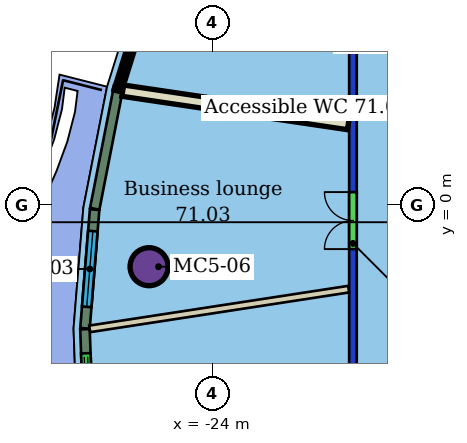
"""IFC4 building model, lengths in metres.
Left out: names, types, materials, properties, quantities, classifications, styles, units other than length and angle.
Written with IfcOpenShell. Run it as: python <this file> out.ifc"""

import sys

from ifc_helpers import new_model, si_unit, direction, frame, frame_2d, origin, origin_2d, place, context, subcontext, project, spatial, rectangle, hollow_circle, extrude, element, fill, save


model = new_model("IFC4")
c1 = context("Model", 3, precision=1e-05, world=origin(), true_north=direction((0.0, 1.0)))
c2 = subcontext(c1, "Body", "Model", "MODEL_VIEW")
j1 = project(units=[si_unit("LENGTHUNIT", "METRE"), si_unit("PLANEANGLEUNIT", "RADIAN")], contexts=[c1])
p1 = place(None, origin())
s1 = spatial("IfcSite", under=j1, at=p1, CompositionType="ELEMENT")
p2 = place(p1, origin())
s2 = spatial("IfcBuilding", under=s1, at=p2, CompositionType="ELEMENT")
p3 = place(p2, frame((0.0, 0.0, 286.5)))
s3 = spatial("IfcBuildingStorey", under=s2, at=p3, CompositionType="ELEMENT", Elevation=286.5)
p4 = place(p3, frame((-25.666, -1.62, 0.0), z_axis=(0.0, 0.0, 1.0), x_axis=(1.0, 0.0, 0.0)))
e1 = element("IfcColumn", 1, at=p4, inside=s3, PredefinedType="COLUMN", context=c2, shape_type="SweptSolid", body=[
    extrude(hollow_circle(Radius=0.5, WallThickness=0.04, at=origin_2d()), origin(), (0.0, 0.0, 1.0), 3.45),
])
p5 = place(p3, frame((-20.3, -9.8, 0.0), z_axis=(0.0, 0.0, 1.0), x_axis=(0.0, 1.0, 0.0)))
e2 = element("IfcWall", 2, at=p5, inside=s3, PredefinedType="PARTITIONING", context=c2, shape_type="SweptSolid", body=[
    extrude(rectangle(XDim=19.6, YDim=0.2, at=frame_2d((9.8, 0.0))), origin(), (0.0, 0.0, 1.0), 3.1),
])
p6 = place(p5, frame((8.643, 0.0, 0.0)))
e3 = element("IfcOpeningElement", 3, at=p6, cuts=e2, PredefinedType="OPENING", context=c2, shape_type="SweptSolid", body=[
    extrude(rectangle(XDim=1.5, YDim=2.1, at=frame_2d((0.75, 1.05))), frame((0.0, 0.11, 0.0), z_axis=(0.0, -1.0, 0.0), x_axis=(1.0, 0.0, 0.0)), (0.0, 0.0, 1.0), 0.22),
])
p7 = place(p5, frame((4.379, 0.0, 0.0)))
e4 = element("IfcOpeningElement", 4, at=p7, cuts=e2, PredefinedType="OPENING", context=c2, shape_type="SweptSolid", body=[
    extrude(rectangle(XDim=1.0, YDim=2.1, at=frame_2d((0.5, 1.05))), frame((0.0, 0.11, 0.0), z_axis=(0.0, -1.0, 0.0), x_axis=(1.0, 0.0, 0.0)), (0.0, 0.0, 1.0), 0.22),
])
p8 = place(p3, frame((-26.358, 3.012, 0.0), z_axis=(0.0, 0.0, 1.0), x_axis=(0.989235111516, -0.146334869885, 0.0)))
e5 = element("IfcWall", 5, at=p8, inside=s3, PredefinedType="PARTITIONING", context=c2, shape_type="SweptSolid", body=[
    extrude(rectangle(XDim=6.001, YDim=0.3, at=frame_2d((3.0, 0.0))), origin(), (0.0, 0.0, 1.0), 3.45),
])
p9 = place(p3, frame((-27.228, -3.256, 0.0), z_axis=(0.0, 0.0, 1.0), x_axis=(0.988435478187, 0.151642030654, 0.0)))
e6 = element("IfcWall", 6, at=p9, inside=s3, PredefinedType="PARTITIONING", context=c2, shape_type="SweptSolid", body=[
    extrude(rectangle(XDim=6.894, YDim=0.175, at=frame_2d((3.447, 0.0))), origin(), (0.0, 0.0, 1.0), 3.45),
])
p10 = place(p3, frame((-26.49, 2.989, 0.0), z_axis=(0.0, 0.0, 1.0), x_axis=(-0.192470190708, -0.981302820585, 0.0)))
e7 = element("IfcWall", 7, at=p10, inside=s3, PredefinedType="SOLIDWALL", context=c2, shape_type="SweptSolid", body=[
    extrude(rectangle(XDim=3.143, YDim=0.25, at=frame_2d((1.572, 0.0))), origin(), (0.0, 0.0, 1.0), 3.15),
])
p11 = place(p3, frame((-27.098, -0.118, 0.0), z_axis=(0.0, 0.0, 1.0), x_axis=(-0.080847238515, -0.996726504125, 0.0)))
e8 = element("IfcWall", 8, at=p11, inside=s3, PredefinedType="SOLIDWALL", context=c2, shape_type="SweptSolid", body=[
    extrude(rectangle(XDim=3.135, YDim=0.25, at=frame_2d((1.567, 0.0))), origin(), (0.0, 0.0, 1.0), 3.15),
])
p12 = place(p11, frame((0.567, 0.0, 0.9)))
e9 = element("IfcOpeningElement", 9, at=p12, cuts=e8, PredefinedType="OPENING", context=c2, shape_type="SweptSolid", body=[
    extrude(rectangle(XDim=2.0, YDim=2.1, at=frame_2d((1.0, 1.05))), frame((0.0, 0.135, 0.0), z_axis=(0.0, -1.0, 0.0), x_axis=(1.0, 0.0, 0.0)), (0.0, 0.0, 1.0), 0.27),
])
p13 = place(p3, frame((-27.352, -3.265, 0.0), z_axis=(0.0, 0.0, 1.0), x_axis=(0.035961121069, -0.999353189704, 0.0)))
e10 = element("IfcWall", 10, at=p13, inside=s3, PredefinedType="SOLIDWALL", context=c2, shape_type="SweptSolid", body=[
    extrude(rectangle(XDim=3.069, YDim=0.25, at=frame_2d((1.534, 0.0))), origin(), (0.0, 0.0, 1.0), 3.15),
])
p14 = place(p13, frame((0.634, 0.0, 0.0)))
e11 = element("IfcOpeningElement", 11, at=p14, cuts=e10, PredefinedType="OPENING", context=c2, shape_type="SweptSolid", body=[
    extrude(rectangle(XDim=1.8, YDim=2.4, at=frame_2d((0.9, 1.2))), frame((0.0, 0.135, 0.0), z_axis=(0.0, -1.0, 0.0), x_axis=(1.0, 0.0, 0.0)), (0.0, 0.0, 1.0), 0.27),
])
p15 = place(p6, origin())
e12 = element("IfcDoor", 12, at=p15, inside=s3, OperationType="DOUBLE_DOOR_SINGLE_SWING", PredefinedType="DOOR", context=c2, shape_type="SweptSolid", body=[
    extrude(rectangle(XDim=1.5, YDim=2.1, at=frame_2d((0.75, 1.05))), frame((0.0, 0.025, 0.0), z_axis=(0.0, -1.0, 0.0), x_axis=(1.0, 0.0, 0.0)), (0.0, 0.0, 1.0), 0.05),
])
fill(e3, e12)
p16 = place(p12, origin())
e13 = element("IfcWindow", 13, at=p16, inside=s3, PartitioningType="SINGLE_PANEL", PredefinedType="WINDOW", context=c2, shape_type="SweptSolid", body=[
    extrude(rectangle(XDim=2.0, YDim=2.1, at=frame_2d((1.0, 1.05))), frame((0.0, 0.03, 0.0), z_axis=(0.0, -1.0, 0.0), x_axis=(1.0, 0.0, 0.0)), (0.0, 0.0, 1.0), 0.06),
])
fill(e9, e13)
p17 = place(p14, origin())
e14 = element("IfcDoor", 14, at=p17, inside=s3, OperationType="DOUBLE_DOOR_SLIDING", PredefinedType="DOOR", context=c2, shape_type="SweptSolid", body=[
    extrude(rectangle(XDim=1.8, YDim=2.4, at=frame_2d((0.9, 1.2))), frame((0.0, 0.025, 0.0), z_axis=(0.0, -1.0, 0.0), x_axis=(1.0, 0.0, 0.0)), (0.0, 0.0, 1.0), 0.05),
])
fill(e11, e14)
save(model, sys.argv[1])
